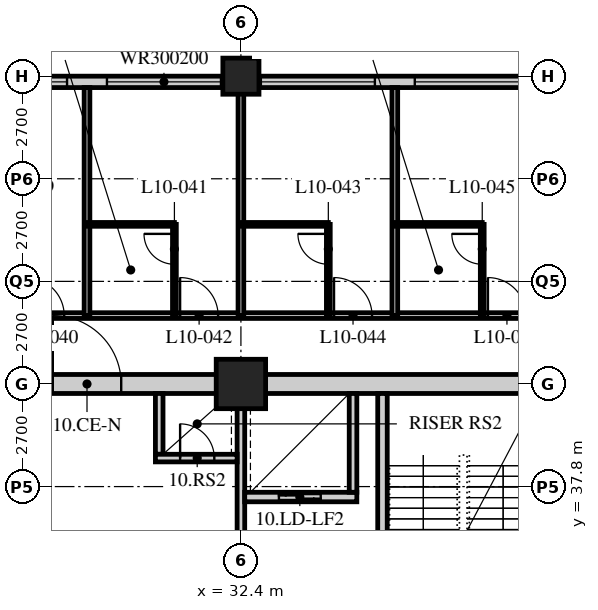
"""IFC4 building model, lengths in metres.
Left out: names, types, materials, properties, quantities, classifications, styles, units other than length and angle.
Written with IfcOpenShell. Run it as: python <this file> out.ifc"""

import sys

from ifc_helpers import new_model, si_unit, direction, frame, frame_2d, origin, origin_2d, place, context, subcontext, project, spatial, rectangle, hollow_rectangle, extrude, element, fill, save


model = new_model("IFC4")
c1 = context("Model", 3, precision=1e-05, world=origin(), true_north=direction((0.0, 1.0)))
c2 = subcontext(c1, "Body", "Model", "MODEL_VIEW")
j1 = project(units=[si_unit("LENGTHUNIT", "METRE"), si_unit("PLANEANGLEUNIT", "RADIAN")], contexts=[c1])
p1 = place(None, origin())
s1 = spatial("IfcSite", under=j1, at=p1, CompositionType="ELEMENT")
p2 = place(p1, origin())
s2 = spatial("IfcBuilding", under=s1, at=p2, CompositionType="ELEMENT")
p3 = place(p2, frame((0.0, 0.0, 46.6)))
s3 = spatial("IfcBuildingStorey", under=s2, at=p3, CompositionType="ELEMENT", Elevation=46.6)
p4 = place(p3, frame((32.4, 40.5, 0.0), z_axis=(0.0, 0.0, 1.0), x_axis=(1.0, 0.0, 0.0)))
e1 = element("IfcColumn", 1, at=p4, inside=s3, PredefinedType="COLUMN", context=c2, shape_type="SweptSolid", body=[
    extrude(hollow_rectangle(XDim=1.3, YDim=1.3, WallThickness=0.13, at=origin_2d()), origin(), (0.0, 0.0, 1.0), 3.4),
])
p5 = place(p3, frame((32.4, 48.6, 0.0), z_axis=(0.0, 0.0, 1.0), x_axis=(1.0, 0.0, 0.0)))
e2 = element("IfcColumn", 2, at=p5, inside=s3, PredefinedType="COLUMN", context=c2, shape_type="SweptSolid", body=[
    extrude(hollow_rectangle(XDim=0.95, YDim=0.95, WallThickness=0.095, at=origin_2d()), origin(), (0.0, 0.0, 1.0), 3.4),
])
p6 = place(p3, frame((48.3, 48.45, 0.0), z_axis=(0.0, 0.0, 1.0), x_axis=(-1.0, 0.0, 0.0)))
e3 = element("IfcWall", 3, at=p6, inside=s3, PredefinedType="SOLIDWALL", context=c2, shape_type="SweptSolid", body=[
    extrude(rectangle(XDim=40.2, YDim=0.3, at=frame_2d((20.1, 0.0))), origin(), (0.0, 0.0, 1.0), 3.19),
])
p7 = place(p6, frame((0.225, 0.0, 0.9)))
e4 = element("IfcOpeningElement", 4, at=p7, cuts=e3, PredefinedType="OPENING", context=c2, shape_type="SweptSolid", body=[
    extrude(rectangle(XDim=3.0, YDim=2.0, at=frame_2d((1.5, 1.0))), frame((0.0, 0.16, 0.0), z_axis=(0.0, -1.0, 0.0), x_axis=(1.0, 0.0, 0.0)), (0.0, 0.0, 1.0), 0.32),
])
p8 = place(p6, frame((4.275, 0.0, 0.9)))
e5 = element("IfcOpeningElement", 5, at=p8, cuts=e3, PredefinedType="OPENING", context=c2, shape_type="SweptSolid", body=[
    extrude(rectangle(XDim=3.0, YDim=2.0, at=frame_2d((1.5, 1.0))), frame((0.0, 0.16, 0.0), z_axis=(0.0, -1.0, 0.0), x_axis=(1.0, 0.0, 0.0)), (0.0, 0.0, 1.0), 0.32),
])
p9 = place(p6, frame((8.325, 0.0, 0.9)))
e6 = element("IfcOpeningElement", 6, at=p9, cuts=e3, PredefinedType="OPENING", context=c2, shape_type="SweptSolid", body=[
    extrude(rectangle(XDim=3.0, YDim=2.0, at=frame_2d((1.5, 1.0))), frame((0.0, 0.16, 0.0), z_axis=(0.0, -1.0, 0.0), x_axis=(1.0, 0.0, 0.0)), (0.0, 0.0, 1.0), 0.32),
])
p10 = place(p6, frame((12.375, 0.0, 0.9)))
e7 = element("IfcOpeningElement", 7, at=p10, cuts=e3, PredefinedType="OPENING", context=c2, shape_type="SweptSolid", body=[
    extrude(rectangle(XDim=3.0, YDim=2.0, at=frame_2d((1.5, 1.0))), frame((0.0, 0.16, 0.0), z_axis=(0.0, -1.0, 0.0), x_axis=(1.0, 0.0, 0.0)), (0.0, 0.0, 1.0), 0.32),
])
p11 = place(p6, frame((16.425, 0.0, 0.9)))
e8 = element("IfcOpeningElement", 8, at=p11, cuts=e3, PredefinedType="OPENING", context=c2, shape_type="SweptSolid", body=[
    extrude(rectangle(XDim=3.0, YDim=2.0, at=frame_2d((1.5, 1.0))), frame((0.0, 0.16, 0.0), z_axis=(0.0, -1.0, 0.0), x_axis=(1.0, 0.0, 0.0)), (0.0, 0.0, 1.0), 0.32),
])
p12 = place(p6, frame((20.475, 0.0, 0.9)))
e9 = element("IfcOpeningElement", 9, at=p12, cuts=e3, PredefinedType="OPENING", context=c2, shape_type="SweptSolid", body=[
    extrude(rectangle(XDim=3.0, YDim=2.0, at=frame_2d((1.5, 1.0))), frame((0.0, 0.16, 0.0), z_axis=(0.0, -1.0, 0.0), x_axis=(1.0, 0.0, 0.0)), (0.0, 0.0, 1.0), 0.32),
])
p13 = place(p6, frame((24.525, 0.0, 0.9)))
e10 = element("IfcOpeningElement", 10, at=p13, cuts=e3, PredefinedType="OPENING", context=c2, shape_type="SweptSolid", body=[
    extrude(rectangle(XDim=3.0, YDim=2.0, at=frame_2d((1.5, 1.0))), frame((0.0, 0.16, 0.0), z_axis=(0.0, -1.0, 0.0), x_axis=(1.0, 0.0, 0.0)), (0.0, 0.0, 1.0), 0.32),
])
p14 = place(p6, frame((28.575, 0.0, 0.9)))
e11 = element("IfcOpeningElement", 11, at=p14, cuts=e3, PredefinedType="OPENING", context=c2, shape_type="SweptSolid", body=[
    extrude(rectangle(XDim=3.0, YDim=2.0, at=frame_2d((1.5, 1.0))), frame((0.0, 0.16, 0.0), z_axis=(0.0, -1.0, 0.0), x_axis=(1.0, 0.0, 0.0)), (0.0, 0.0, 1.0), 0.32),
])
p15 = place(p6, frame((32.625, 0.0, 0.9)))
e12 = element("IfcOpeningElement", 12, at=p15, cuts=e3, PredefinedType="OPENING", context=c2, shape_type="SweptSolid", body=[
    extrude(rectangle(XDim=3.0, YDim=2.0, at=frame_2d((1.5, 1.0))), frame((0.0, 0.16, 0.0), z_axis=(0.0, -1.0, 0.0), x_axis=(1.0, 0.0, 0.0)), (0.0, 0.0, 1.0), 0.32),
])
p16 = place(p6, frame((36.675, 0.0, 0.9)))
e13 = element("IfcOpeningElement", 13, at=p16, cuts=e3, PredefinedType="OPENING", context=c2, shape_type="SweptSolid", body=[
    extrude(rectangle(XDim=3.0, YDim=2.0, at=frame_2d((1.5, 1.0))), frame((0.0, 0.16, 0.0), z_axis=(0.0, -1.0, 0.0), x_axis=(1.0, 0.0, 0.0)), (0.0, 0.0, 1.0), 0.32),
])
p17 = place(p3, frame((8.1, 42.3, 0.0), z_axis=(0.0, 0.0, 1.0), x_axis=(1.0, 0.0, 0.0)))
e14 = element("IfcWall", 14, at=p17, inside=s3, PredefinedType="PARTITIONING", context=c2, shape_type="SweptSolid", body=[
    extrude(rectangle(XDim=40.5, YDim=0.15, at=frame_2d((20.25, 0.0))), origin(), (0.0, 0.0, 1.0), 3.19),
])
p18 = place(p17, frame((6.5, 0.0, 0.0)))
e15 = element("IfcOpeningElement", 15, at=p18, cuts=e14, PredefinedType="OPENING", context=c2, shape_type="SweptSolid", body=[
    extrude(rectangle(XDim=1.0, YDim=2.1, at=frame_2d((0.5, 1.05))), frame((0.0, 0.085, 0.0), z_axis=(0.0, -1.0, 0.0), x_axis=(1.0, 0.0, 0.0)), (0.0, 0.0, 1.0), 0.17),
])
p19 = place(p17, frame((10.55, 0.0, 0.0)))
e16 = element("IfcOpeningElement", 16, at=p19, cuts=e14, PredefinedType="OPENING", context=c2, shape_type="SweptSolid", body=[
    extrude(rectangle(XDim=1.0, YDim=2.1, at=frame_2d((0.5, 1.05))), frame((0.0, 0.085, 0.0), z_axis=(0.0, -1.0, 0.0), x_axis=(1.0, 0.0, 0.0)), (0.0, 0.0, 1.0), 0.17),
])
p20 = place(p17, frame((14.6, 0.0, 0.0)))
e17 = element("IfcOpeningElement", 17, at=p20, cuts=e14, PredefinedType="OPENING", context=c2, shape_type="SweptSolid", body=[
    extrude(rectangle(XDim=1.0, YDim=2.1, at=frame_2d((0.5, 1.05))), frame((0.0, 0.085, 0.0), z_axis=(0.0, -1.0, 0.0), x_axis=(1.0, 0.0, 0.0)), (0.0, 0.0, 1.0), 0.17),
])
p21 = place(p17, frame((18.65, 0.0, 0.0)))
e18 = element("IfcOpeningElement", 18, at=p21, cuts=e14, PredefinedType="OPENING", context=c2, shape_type="SweptSolid", body=[
    extrude(rectangle(XDim=1.0, YDim=2.1, at=frame_2d((0.5, 1.05))), frame((0.0, 0.085, 0.0), z_axis=(0.0, -1.0, 0.0), x_axis=(1.0, 0.0, 0.0)), (0.0, 0.0, 1.0), 0.17),
])
p22 = place(p17, frame((22.7, 0.0, 0.0)))
e19 = element("IfcOpeningElement", 19, at=p22, cuts=e14, PredefinedType="OPENING", context=c2, shape_type="SweptSolid", body=[
    extrude(rectangle(XDim=1.0, YDim=2.1, at=frame_2d((0.5, 1.05))), frame((0.0, 0.085, 0.0), z_axis=(0.0, -1.0, 0.0), x_axis=(1.0, 0.0, 0.0)), (0.0, 0.0, 1.0), 0.17),
])
p23 = place(p17, frame((26.75, 0.0, 0.0)))
e20 = element("IfcOpeningElement", 20, at=p23, cuts=e14, PredefinedType="OPENING", context=c2, shape_type="SweptSolid", body=[
    extrude(rectangle(XDim=1.0, YDim=2.1, at=frame_2d((0.5, 1.05))), frame((0.0, 0.085, 0.0), z_axis=(0.0, -1.0, 0.0), x_axis=(1.0, 0.0, 0.0)), (0.0, 0.0, 1.0), 0.17),
])
p24 = place(p17, frame((30.8, 0.0, 0.0)))
e21 = element("IfcOpeningElement", 21, at=p24, cuts=e14, PredefinedType="OPENING", context=c2, shape_type="SweptSolid", body=[
    extrude(rectangle(XDim=1.0, YDim=2.1, at=frame_2d((0.5, 1.05))), frame((0.0, 0.085, 0.0), z_axis=(0.0, -1.0, 0.0), x_axis=(1.0, 0.0, 0.0)), (0.0, 0.0, 1.0), 0.17),
])
p25 = place(p17, frame((34.85, 0.0, 0.0)))
e22 = element("IfcOpeningElement", 22, at=p25, cuts=e14, PredefinedType="OPENING", context=c2, shape_type="SweptSolid", body=[
    extrude(rectangle(XDim=1.0, YDim=2.1, at=frame_2d((0.5, 1.05))), frame((0.0, 0.085, 0.0), z_axis=(0.0, -1.0, 0.0), x_axis=(1.0, 0.0, 0.0)), (0.0, 0.0, 1.0), 0.17),
])
p26 = place(p17, frame((36.875, 0.0, 0.0)))
e23 = element("IfcOpeningElement", 23, at=p26, cuts=e14, PredefinedType="OPENING", context=c2, shape_type="SweptSolid", body=[
    extrude(rectangle(XDim=1.0, YDim=2.1, at=frame_2d((0.5, 1.05))), frame((0.0, 0.085, 0.0), z_axis=(0.0, -1.0, 0.0), x_axis=(1.0, 0.0, 0.0)), (0.0, 0.0, 1.0), 0.17),
])
p27 = place(p17, frame((2.625, 0.0, 0.0)))
e24 = element("IfcOpeningElement", 24, at=p27, cuts=e14, PredefinedType="OPENING", context=c2, shape_type="SweptSolid", body=[
    extrude(rectangle(XDim=1.0, YDim=2.1, at=frame_2d((0.5, 1.05))), frame((0.0, 0.085, 0.0), z_axis=(0.0, -1.0, 0.0), x_axis=(1.0, 0.0, 0.0)), (0.0, 0.0, 1.0), 0.17),
])
p28 = place(p3, frame((28.35, 42.3, 0.0), z_axis=(0.0, 0.0, 1.0), x_axis=(0.0, 1.0, 0.0)))
e25 = element("IfcWall", 25, at=p28, inside=s3, PredefinedType="PARTITIONING", context=c2, shape_type="SweptSolid", body=[
    extrude(rectangle(XDim=6.0, YDim=0.15, at=frame_2d((3.0, 0.0))), origin(), (0.0, 0.0, 1.0), 3.19),
])
p29 = place(p3, frame((28.35, 44.7, 0.0), z_axis=(0.0, 0.0, 1.0), x_axis=(1.0, 0.0, 0.0)))
e26 = element("IfcWall", 26, at=p29, inside=s3, PredefinedType="PARTITIONING", context=c2, shape_type="SweptSolid", body=[
    extrude(rectangle(XDim=2.3, YDim=0.1, at=frame_2d((1.15, 0.0))), origin(), (0.0, 0.0, 1.0), 3.19),
])
p30 = place(p3, frame((30.65, 42.3, 0.0), z_axis=(0.0, 0.0, 1.0), x_axis=(0.0, 1.0, 0.0)))
e27 = element("IfcWall", 27, at=p30, inside=s3, PredefinedType="PARTITIONING", context=c2, shape_type="SweptSolid", body=[
    extrude(rectangle(XDim=2.4, YDim=0.1, at=frame_2d((1.2, 0.0))), origin(), (0.0, 0.0, 1.0), 3.19),
])
p31 = place(p30, frame((1.35, 0.0, 0.0)))
e28 = element("IfcOpeningElement", 28, at=p31, cuts=e27, PredefinedType="OPENING", context=c2, shape_type="SweptSolid", body=[
    extrude(rectangle(XDim=0.8, YDim=2.1, at=frame_2d((0.4, 1.05))), frame((0.0, 0.06, 0.0), z_axis=(0.0, -1.0, 0.0), x_axis=(1.0, 0.0, 0.0)), (0.0, 0.0, 1.0), 0.12),
])
p32 = place(p3, frame((32.4, 42.3, 0.0), z_axis=(0.0, 0.0, 1.0), x_axis=(0.0, 1.0, 0.0)))
e29 = element("IfcWall", 29, at=p32, inside=s3, PredefinedType="PARTITIONING", context=c2, shape_type="SweptSolid", body=[
    extrude(rectangle(XDim=6.0, YDim=0.15, at=frame_2d((3.0, 0.0))), origin(), (0.0, 0.0, 1.0), 2.578),
])
p33 = place(p3, frame((32.4, 44.7, 0.0), z_axis=(0.0, 0.0, 1.0), x_axis=(1.0, 0.0, 0.0)))
e30 = element("IfcWall", 30, at=p33, inside=s3, PredefinedType="PARTITIONING", context=c2, shape_type="SweptSolid", body=[
    extrude(rectangle(XDim=2.3, YDim=0.1, at=frame_2d((1.15, 0.0))), origin(), (0.0, 0.0, 1.0), 3.19),
])
p34 = place(p3, frame((34.7, 42.3, 0.0), z_axis=(0.0, 0.0, 1.0), x_axis=(0.0, 1.0, 0.0)))
e31 = element("IfcWall", 31, at=p34, inside=s3, PredefinedType="PARTITIONING", context=c2, shape_type="SweptSolid", body=[
    extrude(rectangle(XDim=2.4, YDim=0.1, at=frame_2d((1.2, 0.0))), origin(), (0.0, 0.0, 1.0), 3.19),
])
p35 = place(p34, frame((1.35, 0.0, 0.0)))
e32 = element("IfcOpeningElement", 32, at=p35, cuts=e31, PredefinedType="OPENING", context=c2, shape_type="SweptSolid", body=[
    extrude(rectangle(XDim=0.8, YDim=2.1, at=frame_2d((0.4, 1.05))), frame((0.0, 0.06, 0.0), z_axis=(0.0, -1.0, 0.0), x_axis=(1.0, 0.0, 0.0)), (0.0, 0.0, 1.0), 0.12),
])
p36 = place(p3, frame((36.45, 42.3, 0.0), z_axis=(0.0, 0.0, 1.0), x_axis=(0.0, 1.0, 0.0)))
e33 = element("IfcWall", 33, at=p36, inside=s3, PredefinedType="PARTITIONING", context=c2, shape_type="SweptSolid", body=[
    extrude(rectangle(XDim=6.0, YDim=0.15, at=frame_2d((3.0, 0.0))), origin(), (0.0, 0.0, 1.0), 3.19),
])
p37 = place(p3, frame((36.45, 44.7, 0.0), z_axis=(0.0, 0.0, 1.0), x_axis=(1.0, 0.0, 0.0)))
e34 = element("IfcWall", 34, at=p37, inside=s3, PredefinedType="PARTITIONING", context=c2, shape_type="SweptSolid", body=[
    extrude(rectangle(XDim=2.3, YDim=0.1, at=frame_2d((1.15, 0.0))), origin(), (0.0, 0.0, 1.0), 3.19),
])
p38 = place(p3, frame((38.75, 42.3, 0.0), z_axis=(0.0, 0.0, 1.0), x_axis=(0.0, 1.0, 0.0)))
e35 = element("IfcWall", 35, at=p38, inside=s3, PredefinedType="PARTITIONING", context=c2, shape_type="SweptSolid", body=[
    extrude(rectangle(XDim=2.4, YDim=0.1, at=frame_2d((1.2, 0.0))), origin(), (0.0, 0.0, 1.0), 3.19),
])
p39 = place(p38, frame((1.35, 0.0, 0.0)))
e36 = element("IfcOpeningElement", 36, at=p39, cuts=e35, PredefinedType="OPENING", context=c2, shape_type="SweptSolid", body=[
    extrude(rectangle(XDim=0.8, YDim=2.1, at=frame_2d((0.4, 1.05))), frame((0.0, 0.06, 0.0), z_axis=(0.0, -1.0, 0.0), x_axis=(1.0, 0.0, 0.0)), (0.0, 0.0, 1.0), 0.12),
])
p40 = place(p3, frame((15.95, 40.5, 0.0), z_axis=(0.0, 0.0, 1.0), x_axis=(1.0, 0.0, 0.0)))
e37 = element("IfcWall", 37, at=p40, inside=s3, PredefinedType="SOLIDWALL", context=c2, shape_type="SweptSolid", body=[
    extrude(rectangle(XDim=24.8, YDim=0.5, at=frame_2d((12.4, 0.0))), origin(), (0.0, 0.0, 1.0), 2.54),
])
p41 = place(p40, frame((11.5, 0.0, 0.0)))
e38 = element("IfcOpeningElement", 38, at=p41, cuts=e37, PredefinedType="OPENING", context=c2, shape_type="SweptSolid", body=[
    extrude(rectangle(XDim=1.8, YDim=2.4, at=frame_2d((0.9, 1.2))), frame((0.0, 0.26, 0.0), z_axis=(0.0, -1.0, 0.0), x_axis=(1.0, 0.0, 0.0)), (0.0, 0.0, 1.0), 0.52),
])
p42 = place(p3, frame((32.4, 32.5, 0.0), z_axis=(0.0, 0.0, 1.0), x_axis=(0.0, 1.0, 0.0)))
e39 = element("IfcWall", 39, at=p42, inside=s3, PredefinedType="SOLIDWALL", context=c2, shape_type="SweptSolid", body=[
    extrude(rectangle(XDim=7.75, YDim=0.2, at=frame_2d((3.875, 0.0))), origin(), (0.0, 0.0, 1.0), 2.578),
])
p43 = place(p42, frame((1.9, 0.0, 0.0)))
e40 = element("IfcOpeningElement", 40, at=p43, cuts=e39, PredefinedType="OPENING", context=c2, shape_type="SweptSolid", body=[
    extrude(rectangle(XDim=1.2, YDim=2.1, at=frame_2d((0.6, 1.05))), frame((0.0, 0.11, 0.0), z_axis=(0.0, -1.0, 0.0), x_axis=(1.0, 0.0, 0.0)), (0.0, 0.0, 1.0), 0.22),
])
p44 = place(p3, frame((36.125, 32.5, 0.0), z_axis=(0.0, 0.0, 1.0), x_axis=(0.0, 1.0, 0.0)))
e41 = element("IfcWall", 41, at=p44, inside=s3, PredefinedType="SOLIDWALL", context=c2, shape_type="SweptSolid", body=[
    extrude(rectangle(XDim=7.75, YDim=0.25, at=frame_2d((3.875, 0.0))), origin(), (0.0, 0.0, 1.0), 3.19),
])
p45 = place(p44, frame((0.45, 0.0, 0.0)))
e42 = element("IfcOpeningElement", 42, at=p45, cuts=e41, PredefinedType="OPENING", context=c2, shape_type="SweptSolid", body=[
    extrude(rectangle(XDim=1.2, YDim=2.1, at=frame_2d((0.6, 1.05))), frame((0.0, 0.135, 0.0), z_axis=(0.0, -1.0, 0.0), x_axis=(1.0, 0.0, 0.0)), (0.0, 0.0, 1.0), 0.27),
])
p46 = place(p3, frame((32.5, 37.525, 0.0), z_axis=(0.0, 0.0, 1.0), x_axis=(1.0, 0.0, 0.0)))
e43 = element("IfcWall", 43, at=p46, inside=s3, PredefinedType="SOLIDWALL", context=c2, shape_type="SweptSolid", body=[
    extrude(rectangle(XDim=2.95, YDim=0.25, at=frame_2d((1.475, 0.0))), origin(), (0.0, 0.0, 1.0), 3.19),
])
p47 = place(p46, frame((0.9, 0.0, 0.0)))
e44 = element("IfcOpeningElement", 44, at=p47, cuts=e43, PredefinedType="OPENING", context=c2, shape_type="SweptSolid", body=[
    extrude(rectangle(XDim=1.1, YDim=2.4, at=frame_2d((0.55, 1.2))), frame((0.0, 0.135, 0.0), z_axis=(0.0, -1.0, 0.0), x_axis=(1.0, 0.0, 0.0)), (0.0, 0.0, 1.0), 0.27),
])
p48 = place(p3, frame((35.35, 37.65, 0.0), z_axis=(0.0, 0.0, 1.0), x_axis=(0.0, 1.0, 0.0)))
e45 = element("IfcWall", 45, at=p48, inside=s3, PredefinedType="SOLIDWALL", context=c2, shape_type="SweptSolid", body=[
    extrude(rectangle(XDim=2.6, YDim=0.2, at=frame_2d((1.3, 0.0))), origin(), (0.0, 0.0, 1.0), 3.19),
])
p49 = place(p3, frame((30.25, 38.65, 0.0), z_axis=(0.0, 0.0, 1.0), x_axis=(0.0, 1.0, 0.0)))
e46 = element("IfcWall", 46, at=p49, inside=s3, PredefinedType="SOLIDWALL", context=c2, shape_type="SweptSolid", body=[
    extrude(rectangle(XDim=1.6, YDim=0.2, at=frame_2d((0.8, 0.0))), origin(), (0.0, 0.0, 1.0), 3.19),
])
p50 = place(p3, frame((30.15, 38.55, 0.0), z_axis=(0.0, 0.0, 1.0), x_axis=(1.0, 0.0, 0.0)))
e47 = element("IfcWall", 47, at=p50, inside=s3, PredefinedType="SOLIDWALL", context=c2, shape_type="SweptSolid", body=[
    extrude(rectangle(XDim=2.15, YDim=0.2, at=frame_2d((1.075, 0.0))), origin(), (0.0, 0.0, 1.0), 3.19),
])
p51 = place(p50, frame((0.65, 0.0, 0.0)))
e48 = element("IfcOpeningElement", 48, at=p51, cuts=e47, PredefinedType="OPENING", context=c2, shape_type="SweptSolid", body=[
    extrude(rectangle(XDim=0.9, YDim=2.1, at=frame_2d((0.45, 1.05))), frame((0.0, 0.11, 0.0), z_axis=(0.0, -1.0, 0.0), x_axis=(1.0, 0.0, 0.0)), (0.0, 0.0, 1.0), 0.22),
])
p52 = place(p9, origin())
e49 = element("IfcWindow", 49, at=p52, inside=s3, PartitioningType="SINGLE_PANEL", PredefinedType="WINDOW", context=c2, shape_type="SweptSolid", body=[
    extrude(rectangle(XDim=3.0, YDim=2.0, at=frame_2d((1.5, 1.0))), frame((0.0, 0.03, 0.0), z_axis=(0.0, -1.0, 0.0), x_axis=(1.0, 0.0, 0.0)), (0.0, 0.0, 1.0), 0.06),
])
fill(e6, e49)
p53 = place(p10, origin())
e50 = element("IfcWindow", 50, at=p53, inside=s3, PartitioningType="SINGLE_PANEL", PredefinedType="WINDOW", context=c2, shape_type="SweptSolid", body=[
    extrude(rectangle(XDim=3.0, YDim=2.0, at=frame_2d((1.5, 1.0))), frame((0.0, 0.03, 0.0), z_axis=(0.0, -1.0, 0.0), x_axis=(1.0, 0.0, 0.0)), (0.0, 0.0, 1.0), 0.06),
])
fill(e7, e50)
p54 = place(p11, origin())
e51 = element("IfcWindow", 51, at=p54, inside=s3, PartitioningType="SINGLE_PANEL", PredefinedType="WINDOW", context=c2, shape_type="SweptSolid", body=[
    extrude(rectangle(XDim=3.0, YDim=2.0, at=frame_2d((1.5, 1.0))), frame((0.0, 0.03, 0.0), z_axis=(0.0, -1.0, 0.0), x_axis=(1.0, 0.0, 0.0)), (0.0, 0.0, 1.0), 0.06),
])
fill(e8, e51)
p55 = place(p12, origin())
e52 = element("IfcWindow", 52, at=p55, inside=s3, PartitioningType="SINGLE_PANEL", PredefinedType="WINDOW", context=c2, shape_type="SweptSolid", body=[
    extrude(rectangle(XDim=3.0, YDim=2.0, at=frame_2d((1.5, 1.0))), frame((0.0, 0.03, 0.0), z_axis=(0.0, -1.0, 0.0), x_axis=(1.0, 0.0, 0.0)), (0.0, 0.0, 1.0), 0.06),
])
fill(e9, e52)
p56 = place(p21, origin())
e53 = element("IfcDoor", 53, at=p56, inside=s3, OperationType="SINGLE_SWING_LEFT", PredefinedType="DOOR", context=c2, shape_type="SweptSolid", body=[
    extrude(rectangle(XDim=1.0, YDim=2.1, at=frame_2d((0.5, 1.05))), frame((0.0, 0.025, 0.0), z_axis=(0.0, -1.0, 0.0), x_axis=(1.0, 0.0, 0.0)), (0.0, 0.0, 1.0), 0.05),
])
fill(e18, e53)
p57 = place(p31, origin())
e54 = element("IfcDoor", 54, at=p57, inside=s3, OperationType="SINGLE_SWING_RIGHT", PredefinedType="DOOR", context=c2, shape_type="SweptSolid", body=[
    extrude(rectangle(XDim=0.8, YDim=2.1, at=frame_2d((0.4, 1.05))), frame((0.0, 0.025, 0.0), z_axis=(0.0, -1.0, 0.0), x_axis=(1.0, 0.0, 0.0)), (0.0, 0.0, 1.0), 0.05),
])
fill(e28, e54)
p58 = place(p22, origin())
e55 = element("IfcDoor", 55, at=p58, inside=s3, OperationType="SINGLE_SWING_LEFT", PredefinedType="DOOR", context=c2, shape_type="SweptSolid", body=[
    extrude(rectangle(XDim=1.0, YDim=2.1, at=frame_2d((0.5, 1.05))), frame((0.0, 0.025, 0.0), z_axis=(0.0, -1.0, 0.0), x_axis=(1.0, 0.0, 0.0)), (0.0, 0.0, 1.0), 0.05),
])
fill(e19, e55)
p59 = place(p35, origin())
e56 = element("IfcDoor", 56, at=p59, inside=s3, OperationType="SINGLE_SWING_RIGHT", PredefinedType="DOOR", context=c2, shape_type="SweptSolid", body=[
    extrude(rectangle(XDim=0.8, YDim=2.1, at=frame_2d((0.4, 1.05))), frame((0.0, 0.025, 0.0), z_axis=(0.0, -1.0, 0.0), x_axis=(1.0, 0.0, 0.0)), (0.0, 0.0, 1.0), 0.05),
])
fill(e32, e56)
p60 = place(p23, origin())
e57 = element("IfcDoor", 57, at=p60, inside=s3, OperationType="SINGLE_SWING_LEFT", PredefinedType="DOOR", context=c2, shape_type="SweptSolid", body=[
    extrude(rectangle(XDim=1.0, YDim=2.1, at=frame_2d((0.5, 1.05))), frame((0.0, 0.025, 0.0), z_axis=(0.0, -1.0, 0.0), x_axis=(1.0, 0.0, 0.0)), (0.0, 0.0, 1.0), 0.05),
])
fill(e20, e57)
p61 = place(p39, origin())
e58 = element("IfcDoor", 58, at=p61, inside=s3, OperationType="SINGLE_SWING_RIGHT", PredefinedType="DOOR", context=c2, shape_type="SweptSolid", body=[
    extrude(rectangle(XDim=0.8, YDim=2.1, at=frame_2d((0.4, 1.05))), frame((0.0, 0.025, 0.0), z_axis=(0.0, -1.0, 0.0), x_axis=(1.0, 0.0, 0.0)), (0.0, 0.0, 1.0), 0.05),
])
fill(e36, e58)
p62 = place(p24, origin())
e59 = element("IfcDoor", 59, at=p62, inside=s3, OperationType="SINGLE_SWING_LEFT", PredefinedType="DOOR", context=c2, shape_type="SweptSolid", body=[
    extrude(rectangle(XDim=1.0, YDim=2.1, at=frame_2d((0.5, 1.05))), frame((0.0, 0.025, 0.0), z_axis=(0.0, -1.0, 0.0), x_axis=(1.0, 0.0, 0.0)), (0.0, 0.0, 1.0), 0.05),
])
fill(e21, e59)
p63 = place(p51, origin())
e60 = element("IfcDoor", 60, at=p63, inside=s3, OperationType="SINGLE_SWING_LEFT", PredefinedType="DOOR", context=c2, shape_type="SweptSolid", body=[
    extrude(rectangle(XDim=0.9, YDim=2.1, at=frame_2d((0.45, 1.05))), frame((0.0, 0.025, 0.0), z_axis=(0.0, -1.0, 0.0), x_axis=(1.0, 0.0, 0.0)), (0.0, 0.0, 1.0), 0.05),
])
fill(e48, e60)
p64 = place(p47, origin())
e61 = element("IfcDoor", 61, at=p64, inside=s3, OperationType="DOUBLE_DOOR_SLIDING", PredefinedType="DOOR", context=c2, shape_type="SweptSolid", body=[
    extrude(rectangle(XDim=1.1, YDim=2.4, at=frame_2d((0.55, 1.2))), frame((0.0, 0.025, 0.0), z_axis=(0.0, -1.0, 0.0), x_axis=(1.0, 0.0, 0.0)), (0.0, 0.0, 1.0), 0.05),
])
fill(e44, e61)
p65 = place(p41, origin())
e62 = element("IfcDoor", 62, at=p65, inside=s3, OperationType="DOUBLE_DOOR_SINGLE_SWING", PredefinedType="DOOR", context=c2, shape_type="SweptSolid", body=[
    extrude(rectangle(XDim=1.8, YDim=2.4, at=frame_2d((0.9, 1.2))), frame((0.0, 0.025, 0.0), z_axis=(0.0, -1.0, 0.0), x_axis=(1.0, 0.0, 0.0)), (0.0, 0.0, 1.0), 0.05),
])
fill(e38, e62)
save(model, sys.argv[1])
